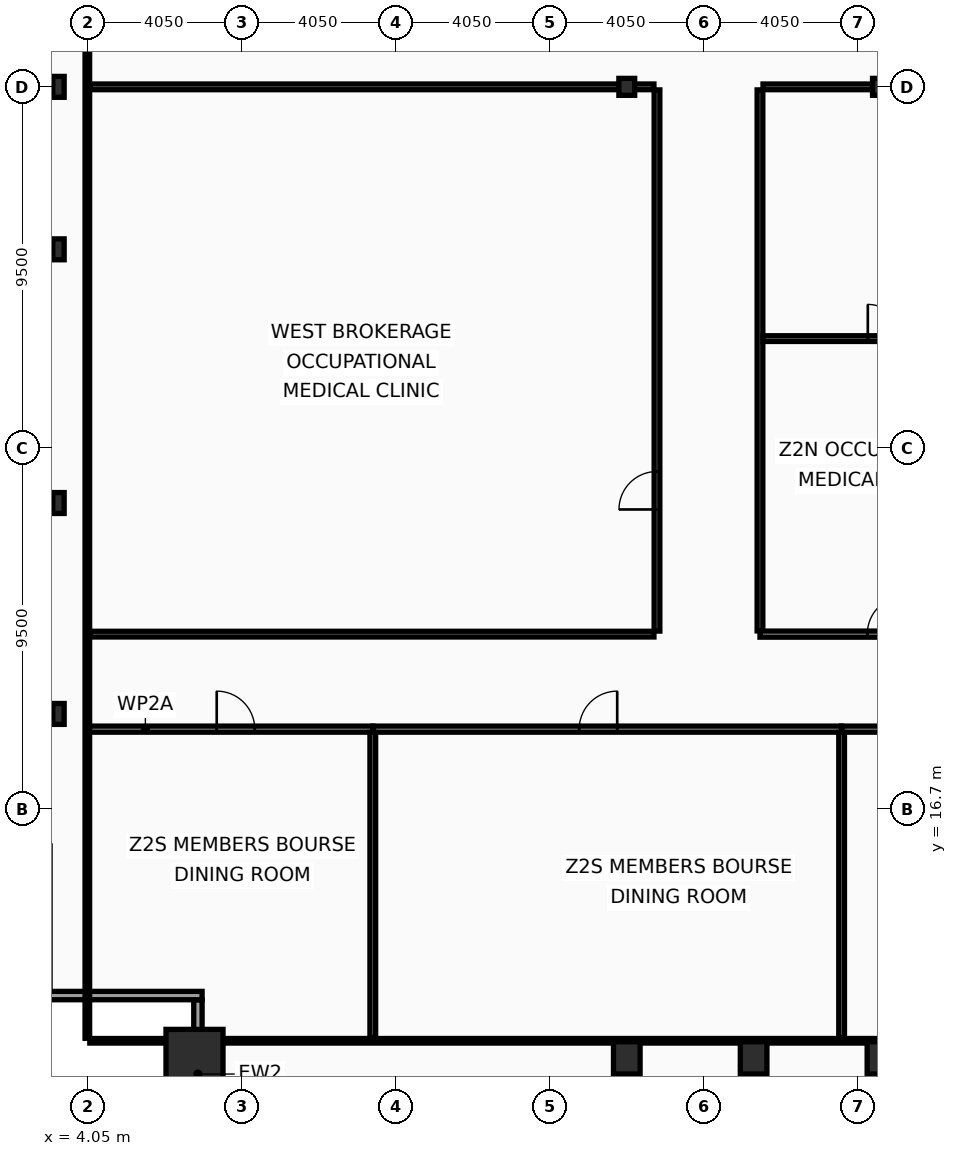
"""IFC4 building model, lengths in metres.
Left out: names, types, materials, properties, quantities, classifications, styles, units other than length and angle.
Written with IfcOpenShell. Run it as: python <this file> out.ifc"""

import sys

from ifc_helpers import new_model, si_unit, direction, frame, frame_2d, origin, origin_2d, place, context, subcontext, project, spatial, rectangle, hollow_rectangle, i_section, extrude, element, fill, save


model = new_model("IFC4")
c1 = context("Model", 3, precision=1e-05, world=origin(), true_north=direction((0.0, 1.0)))
c2 = subcontext(c1, "Body", "Model", "MODEL_VIEW")
j1 = project(units=[si_unit("LENGTHUNIT", "METRE"), si_unit("PLANEANGLEUNIT", "RADIAN")], contexts=[c1])
p1 = place(None, origin())
s1 = spatial("IfcSite", under=j1, at=p1, CompositionType="ELEMENT")
p2 = place(p1, origin())
s2 = spatial("IfcBuilding", under=s1, at=p2, CompositionType="ELEMENT")
p3 = place(p2, frame((0.0, 0.0, 111.0)))
s3 = spatial("IfcBuildingStorey", under=s2, at=p3, CompositionType="ELEMENT", Elevation=111.0)
p4 = place(p3, frame((6.85, 10.15, 0.0), z_axis=(0.0, 0.0, 1.0), x_axis=(1.0, 0.0, 0.0)))
e1 = element("IfcColumn", 1, at=p4, inside=s3, PredefinedType="COLUMN", context=c2, shape_type="SweptSolid", body=[
    extrude(hollow_rectangle(XDim=1.5, YDim=1.5, WallThickness=0.07, at=origin_2d()), origin(), (0.0, 0.0, 1.0), 3.6),
])
for number, where, z_axis, x_axis in (
    (2, (18.225, 10.15, 0.0), (0.0, 0.0, 1.0), (1.0, 0.0, 0.0)),
    (3, (21.562, 10.15, 0.0), (0.0, 0.0, 1.0), (1.0, 0.0, 0.0)),
    (4, (24.9, 10.15, 0.0), (0.0, 0.0, 1.0), (1.0, 0.0, 0.0)),
):
    element("IfcColumn", number, at=place(p3, frame(where, z_axis=z_axis, x_axis=x_axis)), inside=s3, PredefinedType="COLUMN", context=c2, shape_type="SweptSolid", body=[
        extrude(hollow_rectangle(XDim=0.7, YDim=0.85, WallThickness=0.05, at=origin_2d()), origin(), (0.0, 0.0, 1.0), 3.6),
    ])
for number, where, z_axis, x_axis in (
    (5, (3.27, 19.2, 0.0), (0.0, 0.0, 1.0), (1.0, 0.0, 0.0)),
    (6, (3.27, 24.75, 0.0), (0.0, 0.0, 1.0), (1.0, 0.0, 0.0)),
    (7, (3.27, 31.425, 0.0), (0.0, 0.0, 1.0), (1.0, 0.0, 0.0)),
    (8, (3.27, 35.7, 0.0), (0.0, 0.0, 1.0), (1.0, 0.0, 0.0)),
):
    element("IfcColumn", number, at=place(p3, frame(where, z_axis=z_axis, x_axis=x_axis)), inside=s3, PredefinedType="COLUMN", context=c2, shape_type="SweptSolid", body=[
        extrude(i_section(OverallWidth=0.3, OverallDepth=0.55, WebThickness=0.015, FlangeThickness=0.029, at=origin_2d()), origin(), (0.0, 0.0, 1.0), 3.6),
    ])
for number, where, z_axis, x_axis in (
    (9, (18.225, 35.7, 0.0), (0.0, 0.0, 1.0), (1.0, 0.0, 0.0)),
    (10, (24.9, 35.7, 0.0), (0.0, 0.0, 1.0), (1.0, 0.0, 0.0)),
):
    element("IfcColumn", number, at=place(p3, frame(where, z_axis=z_axis, x_axis=x_axis)), inside=s3, PredefinedType="COLUMN", context=c2, shape_type="SweptSolid", body=[
        extrude(i_section(OverallWidth=0.416, OverallDepth=0.446, WebThickness=0.039, FlangeThickness=0.063, at=origin_2d()), origin(), (0.0, 0.0, 1.0), 3.6),
    ])
p5 = place(p3, frame((6.94, 7.77, 0.0), z_axis=(0.0, 0.0, 1.0), x_axis=(0.0, 1.0, 0.0)))
e11 = element("IfcWall", 11, at=p5, inside=s3, PredefinedType="SOLIDWALL", context=c2, shape_type="SweptSolid", body=[
    extrude(rectangle(XDim=3.91, YDim=0.22, at=frame_2d((1.955, 0.0))), origin(), (0.0, 0.0, 1.0), 2.83),
])
p6 = place(p3, frame((7.05, 11.79, 0.0), z_axis=(0.0, 0.0, 1.0), x_axis=(-1.0, 0.0, 0.0)))
e12 = element("IfcWall", 12, at=p6, inside=s3, PredefinedType="SOLIDWALL", context=c2, shape_type="SweptSolid", body=[
    extrude(rectangle(XDim=4.22, YDim=0.22, at=frame_2d((2.11, 0.0))), origin(), (0.0, 0.0, 1.0), 2.83),
])
p7 = place(p3, frame((4.03, 18.8, 0.0), z_axis=(0.0, 0.0, 1.0), x_axis=(1.0, 0.0, 0.0)))
e13 = element("IfcWall", 13, at=p7, inside=s3, PredefinedType="PARTITIONING", context=c2, shape_type="SweptSolid", body=[
    extrude(rectangle(XDim=7.511, YDim=0.16, at=frame_2d((3.756, 0.0))), origin(), (0.0, 0.0, 1.0), 2.73),
])
p8 = place(p7, frame((3.405, 0.0, 0.0)))
e14 = element("IfcOpeningElement", 14, at=p8, cuts=e13, PredefinedType="OPENING", context=c2, shape_type="SweptSolid", body=[
    extrude(rectangle(XDim=1.0, YDim=2.05, at=frame_2d((0.5, 1.025))), frame((0.0, 0.09, 0.0), z_axis=(0.0, -1.0, 0.0), x_axis=(1.0, 0.0, 0.0)), (0.0, 0.0, 1.0), 0.18),
])
p9 = place(p3, frame((11.542, 18.8, 0.0), z_axis=(0.0, 0.0, 1.0), x_axis=(1.0, 0.0, 0.0)))
e15 = element("IfcWall", 15, at=p9, inside=s3, PredefinedType="PARTITIONING", context=c2, shape_type="SweptSolid", body=[
    extrude(rectangle(XDim=12.337, YDim=0.16, at=frame_2d((6.168, 0.0))), origin(), (0.0, 0.0, 1.0), 2.73),
])
p10 = place(p9, frame((5.431, 0.0, 0.0)))
e16 = element("IfcOpeningElement", 16, at=p10, cuts=e15, PredefinedType="OPENING", context=c2, shape_type="SweptSolid", body=[
    extrude(rectangle(XDim=1.0, YDim=2.05, at=frame_2d((0.5, 1.025))), frame((0.0, 0.09, 0.0), z_axis=(0.0, -1.0, 0.0), x_axis=(1.0, 0.0, 0.0)), (0.0, 0.0, 1.0), 0.18),
])
p11 = place(p3, frame((11.542, 10.665, 0.0), z_axis=(0.0, 0.0, 1.0), x_axis=(0.0, 1.0, 0.0)))
e17 = element("IfcWall", 17, at=p11, inside=s3, PredefinedType="PARTITIONING", context=c2, shape_type="SweptSolid", body=[
    extrude(rectangle(XDim=8.05, YDim=0.15, at=frame_2d((4.025, 0.0))), origin(), (0.0, 0.0, 1.0), 3.44),
])
p12 = place(p3, frame((23.878, 18.8, 0.0), z_axis=(0.0, 0.0, 1.0), x_axis=(1.0, 0.0, 0.0)))
e18 = element("IfcWall", 18, at=p12, inside=s3, PredefinedType="PARTITIONING", context=c2, shape_type="SweptSolid", body=[
    extrude(rectangle(XDim=18.258, YDim=0.16, at=frame_2d((9.129, 0.0))), origin(), (0.0, 0.0, 1.0), 2.73),
])
p13 = place(p12, frame((7.918, 0.0, 0.0)))
e19 = element("IfcOpeningElement", 19, at=p13, cuts=e18, PredefinedType="OPENING", context=c2, shape_type="SweptSolid", body=[
    extrude(rectangle(XDim=1.6, YDim=2.15, at=frame_2d((0.8, 1.075))), frame((0.0, 0.09, 0.0), z_axis=(0.0, -1.0, 0.0), x_axis=(1.0, 0.0, 0.0)), (0.0, 0.0, 1.0), 0.18),
])
p14 = place(p3, frame((23.878, 10.665, 0.0), z_axis=(0.0, 0.0, 1.0), x_axis=(0.0, 1.0, 0.0)))
e20 = element("IfcWall", 20, at=p14, inside=s3, PredefinedType="PARTITIONING", context=c2, shape_type="SweptSolid", body=[
    extrude(rectangle(XDim=8.05, YDim=0.15, at=frame_2d((4.025, 0.0))), origin(), (0.0, 0.0, 1.0), 2.88),
])
p15 = place(p3, frame((19.02, 21.38, 0.0), z_axis=(0.0, 0.0, 1.0), x_axis=(0.0, 1.0, 0.0)))
e21 = element("IfcWall", 21, at=p15, inside=s3, PredefinedType="PARTITIONING", context=c2, shape_type="SweptSolid", body=[
    extrude(rectangle(XDim=14.24, YDim=0.15, at=frame_2d((7.12, 0.0))), origin(), (0.0, 0.0, 1.0), 2.88),
])
p16 = place(p15, frame((3.2, 0.0, 0.0)))
e22 = element("IfcOpeningElement", 22, at=p16, cuts=e21, PredefinedType="OPENING", context=c2, shape_type="SweptSolid", body=[
    extrude(rectangle(XDim=1.0, YDim=2.05, at=frame_2d((0.5, 1.025))), frame((0.0, 0.085, 0.0), z_axis=(0.0, -1.0, 0.0), x_axis=(1.0, 0.0, 0.0)), (0.0, 0.0, 1.0), 0.17),
])
for number, where, z_axis, x_axis in (
    (23, (4.095, 21.3, 0.0), (0.0, 0.0, 1.0), (1.0, 0.0, 0.0)),
    (24, (4.095, 35.7, 0.0), (0.0, 0.0, 1.0), (1.0, 0.0, 0.0)),
):
    element("IfcWall", number, at=place(p3, frame(where, z_axis=z_axis, x_axis=x_axis)), inside=s3, PredefinedType="PARTITIONING", context=c2, shape_type="SweptSolid", body=[
        extrude(rectangle(XDim=14.845, YDim=0.15, at=frame_2d((7.422, 0.0))), origin(), (0.0, 0.0, 1.0), 2.73),
    ])
p17 = place(p3, frame((21.73, 21.385, 0.0), z_axis=(0.0, 0.0, 1.0), x_axis=(0.0, 1.0, 0.0)))
e25 = element("IfcWall", 25, at=p17, inside=s3, PredefinedType="PARTITIONING", context=c2, shape_type="SweptSolid", body=[
    extrude(rectangle(XDim=14.235, YDim=0.15, at=frame_2d((7.118, 0.0))), origin(), (0.0, 0.0, 1.0), 2.88),
])
p18 = place(p3, frame((21.81, 35.7, 0.0), z_axis=(0.0, 0.0, 1.0), x_axis=(1.0, 0.0, 0.0)))
e26 = element("IfcWall", 26, at=p18, inside=s3, PredefinedType="PARTITIONING", context=c2, shape_type="SweptSolid", body=[
    extrude(rectangle(XDim=46.995, YDim=0.15, at=frame_2d((23.498, 0.0))), origin(), (0.0, 0.0, 1.0), 2.73),
])
p19 = place(p3, frame((21.73, 21.3, 0.0), z_axis=(0.0, 0.0, 1.0), x_axis=(1.0, 0.0, 0.0)))
e27 = element("IfcWall", 27, at=p19, inside=s3, PredefinedType="PARTITIONING", context=c2, shape_type="SweptSolid", body=[
    extrude(rectangle(XDim=6.128, YDim=0.16, at=frame_2d((3.064, 0.0))), origin(), (0.0, 0.0, 1.0), 2.73),
])
p20 = place(p19, frame((2.824, 0.0, 0.0)))
e28 = element("IfcOpeningElement", 28, at=p20, cuts=e27, PredefinedType="OPENING", context=c2, shape_type="SweptSolid", body=[
    extrude(rectangle(XDim=1.0, YDim=2.05, at=frame_2d((0.5, 1.025))), frame((0.0, 0.09, 0.0), z_axis=(0.0, -1.0, 0.0), x_axis=(1.0, 0.0, 0.0)), (0.0, 0.0, 1.0), 0.18),
])
p21 = place(p3, frame((21.81, 29.076, 0.0), z_axis=(0.0, 0.0, 1.0), x_axis=(1.0, 0.0, 0.0)))
e29 = element("IfcWall", 29, at=p21, inside=s3, PredefinedType="PARTITIONING", context=c2, shape_type="SweptSolid", body=[
    extrude(rectangle(XDim=5.968, YDim=0.15, at=frame_2d((2.984, 0.0))), origin(), (0.0, 0.0, 1.0), 2.73),
])
p22 = place(p21, frame((2.758, 0.0, 0.0)))
e30 = element("IfcOpeningElement", 30, at=p22, cuts=e29, PredefinedType="OPENING", context=c2, shape_type="SweptSolid", body=[
    extrude(rectangle(XDim=0.9, YDim=2.05, at=frame_2d((0.45, 1.025))), frame((0.0, 0.085, 0.0), z_axis=(0.0, -1.0, 0.0), x_axis=(1.0, 0.0, 0.0)), (0.0, 0.0, 1.0), 0.17),
])
p23 = place(p3, frame((4.03, 10.665, 0.0), z_axis=(0.0, 0.0, 1.0), x_axis=(0.0, 1.0, 0.0)))
e31 = element("IfcWall", 31, at=p23, inside=s3, PredefinedType="PARTITIONING", context=c2, shape_type="SweptSolid", body=[
    extrude(rectangle(XDim=42.11, YDim=0.12, at=frame_2d((21.055, 0.0))), origin(), (0.0, 0.0, 1.0), 2.73),
])
p24 = place(p3, frame((4.095, 10.6, 0.0), z_axis=(0.0, 0.0, 1.0), x_axis=(1.0, 0.0, 0.0)))
e32 = element("IfcWall", 32, at=p24, inside=s3, PredefinedType="PARTITIONING", context=c2, shape_type="SweptSolid", body=[
    extrude(rectangle(XDim=64.71, YDim=0.12, at=frame_2d((32.355, 0.0))), origin(), (0.0, 0.0, 1.0), 2.73),
])
p25 = place(p8, origin())
e33 = element("IfcDoor", 33, at=p25, inside=s3, OperationType="SINGLE_SWING_LEFT", PredefinedType="DOOR", context=c2, shape_type="SweptSolid", body=[
    extrude(rectangle(XDim=1.0, YDim=2.05, at=frame_2d((0.5, 1.025))), frame((0.0, 0.025, 0.0), z_axis=(0.0, -1.0, 0.0), x_axis=(1.0, 0.0, 0.0)), (0.0, 0.0, 1.0), 0.05),
])
fill(e14, e33)
p26 = place(p10, origin())
e34 = element("IfcDoor", 34, at=p26, inside=s3, OperationType="SINGLE_SWING_RIGHT", PredefinedType="DOOR", context=c2, shape_type="SweptSolid", body=[
    extrude(rectangle(XDim=1.0, YDim=2.05, at=frame_2d((0.5, 1.025))), frame((0.0, 0.025, 0.0), z_axis=(0.0, -1.0, 0.0), x_axis=(1.0, 0.0, 0.0)), (0.0, 0.0, 1.0), 0.05),
])
fill(e16, e34)
p27 = place(p16, origin())
e35 = element("IfcDoor", 35, at=p27, inside=s3, OperationType="SINGLE_SWING_LEFT", PredefinedType="DOOR", context=c2, shape_type="SweptSolid", body=[
    extrude(rectangle(XDim=1.0, YDim=2.05, at=frame_2d((0.5, 1.025))), frame((0.0, 0.025, 0.0), z_axis=(0.0, -1.0, 0.0), x_axis=(1.0, 0.0, 0.0)), (0.0, 0.0, 1.0), 0.05),
])
fill(e22, e35)
p28 = place(p20, origin())
e36 = element("IfcDoor", 36, at=p28, inside=s3, OperationType="SINGLE_SWING_RIGHT", PredefinedType="DOOR", context=c2, shape_type="SweptSolid", body=[
    extrude(rectangle(XDim=1.0, YDim=2.05, at=frame_2d((0.5, 1.025))), frame((0.0, 0.025, 0.0), z_axis=(0.0, -1.0, 0.0), x_axis=(1.0, 0.0, 0.0)), (0.0, 0.0, 1.0), 0.05),
])
fill(e28, e36)
p29 = place(p22, origin())
e37 = element("IfcDoor", 37, at=p29, inside=s3, OperationType="SINGLE_SWING_LEFT", PredefinedType="DOOR", context=c2, shape_type="SweptSolid", body=[
    extrude(rectangle(XDim=0.9, YDim=2.05, at=frame_2d((0.45, 1.025))), frame((0.0, 0.025, 0.0), z_axis=(0.0, -1.0, 0.0), x_axis=(1.0, 0.0, 0.0)), (0.0, 0.0, 1.0), 0.05),
])
fill(e30, e37)
save(model, sys.argv[1])
